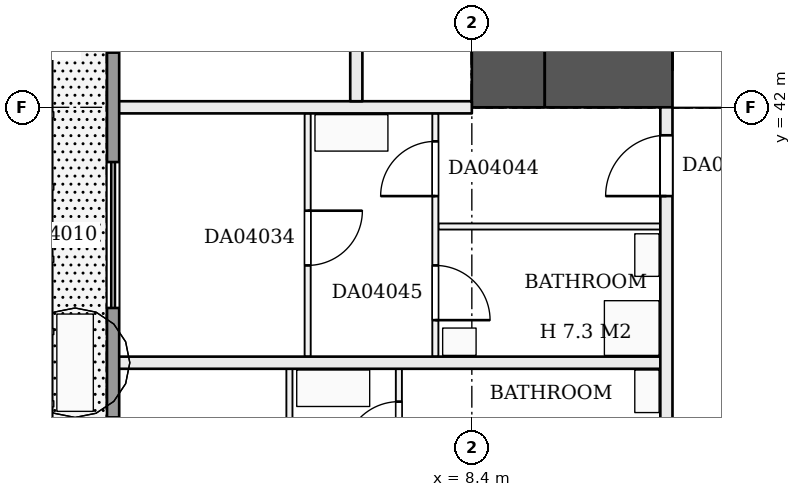
"""IFC4 building model, lengths in metres.
Left out: names, types, materials, properties, quantities, classifications, styles, units other than length and angle.
Written with IfcOpenShell. Run it as: python <this file> out.ifc"""

import sys

from ifc_helpers import new_model, si_unit, direction, frame, frame_2d, origin, place, context, subcontext, project, spatial, rectangle, extrude, element, fill, save


model = new_model("IFC4")
c1 = context("Model", 3, precision=1e-05, world=origin(), true_north=direction((0.0, 1.0)))
c2 = subcontext(c1, "Body", "Model", "MODEL_VIEW")
j1 = project(units=[si_unit("LENGTHUNIT", "METRE"), si_unit("PLANEANGLEUNIT", "RADIAN")], contexts=[c1])
p1 = place(None, origin())
s1 = spatial("IfcSite", under=j1, at=p1, CompositionType="ELEMENT")
p2 = place(p1, origin())
s2 = spatial("IfcBuilding", under=s1, at=p2, CompositionType="ELEMENT")
p3 = place(p2, frame((0.0, 0.0, 25.2)))
s3 = spatial("IfcBuildingStorey", under=s2, at=p3, CompositionType="ELEMENT", Elevation=25.2)
p4 = place(p3, frame((9.0, 58.8, 0.0), z_axis=(0.0, 0.0, 1.0), x_axis=(0.0, -1.0, 0.0)))
e1 = element("IfcWall", 1, at=p4, inside=s3, PredefinedType="SHEAR", context=c2, shape_type="SweptSolid", body=[
    extrude(rectangle(XDim=16.8, YDim=1.2, at=frame_2d((8.4, 0.0))), origin(), (0.0, 0.0, 1.0), 3.22),
])
p5 = place(p4, frame((3.1, 0.0, 0.0)))
e2 = element("IfcOpeningElement", 2, at=p5, cuts=e1, PredefinedType="OPENING", context=c2, shape_type="SweptSolid", body=[
    extrude(rectangle(XDim=1.0, YDim=2.1, at=frame_2d((0.5, 1.05))), frame((0.0, 0.61, 0.0), z_axis=(0.0, -1.0, 0.0), x_axis=(1.0, 0.0, 0.0)), (0.0, 0.0, 1.0), 1.22),
])
p6 = place(p4, frame((12.7, 0.0, 0.0)))
e3 = element("IfcOpeningElement", 3, at=p6, cuts=e1, PredefinedType="OPENING", context=c2, shape_type="SweptSolid", body=[
    extrude(rectangle(XDim=1.0, YDim=2.1, at=frame_2d((0.5, 1.05))), frame((0.0, 0.61, 0.0), z_axis=(0.0, -1.0, 0.0), x_axis=(1.0, 0.0, 0.0)), (0.0, 0.0, 1.0), 1.22),
])
p7 = place(p3, frame((9.6, 42.6, 0.0), z_axis=(0.0, 0.0, 1.0), x_axis=(1.0, 0.0, 0.0)))
e4 = element("IfcWall", 4, at=p7, inside=s3, PredefinedType="SHEAR", context=c2, shape_type="SweptSolid", body=[
    extrude(rectangle(XDim=14.4, YDim=1.2, at=frame_2d((7.2, 0.0))), origin(), (0.0, 0.0, 1.0), 3.22),
])
p8 = place(p7, frame((2.1, 0.0, 0.0)))
e5 = element("IfcOpeningElement", 5, at=p8, cuts=e4, PredefinedType="OPENING", context=c2, shape_type="SweptSolid", body=[
    extrude(rectangle(XDim=1.8, YDim=2.1, at=frame_2d((0.9, 1.05))), frame((0.0, 0.61, 0.0), z_axis=(0.0, -1.0, 0.0), x_axis=(1.0, 0.0, 0.0)), (0.0, 0.0, 1.0), 1.22),
])
p9 = place(p3, frame((2.5, 37.8, 0.0), z_axis=(0.0, 0.0, 1.0), x_axis=(1.0, 0.0, 0.0)))
e6 = element("IfcWall", 6, at=p9, inside=s3, PredefinedType="PARTITIONING", context=c2, shape_type="SweptSolid", body=[
    extrude(rectangle(XDim=9.0, YDim=0.2, at=frame_2d((4.5, 0.0))), origin(), (0.0, 0.0, 1.0), 3.22),
])
p10 = place(p3, frame((7.85, 40.04, 0.0), z_axis=(0.0, 0.0, 1.0), x_axis=(1.0, 0.0, 0.0)))
e7 = element("IfcWall", 7, at=p10, inside=s3, PredefinedType="PARTITIONING", context=c2, shape_type="SweptSolid", body=[
    extrude(rectangle(XDim=3.65, YDim=0.1, at=frame_2d((1.825, 0.0))), origin(), (0.0, 0.0, 1.0), 3.22),
])
p11 = place(p3, frame((2.5, 42.0, 0.0), z_axis=(0.0, 0.0, 1.0), x_axis=(1.0, 0.0, 0.0)))
e8 = element("IfcWall", 8, at=p11, inside=s3, PredefinedType="PARTITIONING", context=c2, shape_type="SweptSolid", body=[
    extrude(rectangle(XDim=5.9, YDim=0.2, at=frame_2d((2.95, 0.0))), origin(), (0.0, 0.0, 1.0), 3.22),
])
p12 = place(p3, frame((5.4, 33.7, 0.0), z_axis=(0.0, 0.0, 1.0), x_axis=(0.0, 1.0, 0.0)))
e9 = element("IfcWall", 9, at=p12, inside=s3, PredefinedType="PARTITIONING", context=c2, shape_type="SweptSolid", body=[
    extrude(rectangle(XDim=4.0, YDim=0.1, at=frame_2d((2.0, 0.0))), origin(), (0.0, 0.0, 1.0), 3.22),
])
p13 = place(p12, frame((1.5, 0.0, 0.0)))
e10 = element("IfcOpeningElement", 10, at=p13, cuts=e9, PredefinedType="OPENING", context=c2, shape_type="SweptSolid", body=[
    extrude(rectangle(XDim=0.9, YDim=2.1, at=frame_2d((0.45, 1.05))), frame((0.0, 0.06, 0.0), z_axis=(0.0, -1.0, 0.0), x_axis=(1.0, 0.0, 0.0)), (0.0, 0.0, 1.0), 0.12),
])
p14 = place(p3, frame((5.7, 37.9, 0.0), z_axis=(0.0, 0.0, 1.0), x_axis=(0.0, 1.0, 0.0)))
e11 = element("IfcWall", 11, at=p14, inside=s3, PredefinedType="PARTITIONING", context=c2, shape_type="SweptSolid", body=[
    extrude(rectangle(XDim=4.0, YDim=0.1, at=frame_2d((2.0, 0.0))), origin(), (0.0, 0.0, 1.0), 3.22),
])
p15 = place(p14, frame((1.5, 0.0, 0.0)))
e12 = element("IfcOpeningElement", 12, at=p15, cuts=e11, PredefinedType="OPENING", context=c2, shape_type="SweptSolid", body=[
    extrude(rectangle(XDim=0.9, YDim=2.1, at=frame_2d((0.45, 1.05))), frame((0.0, 0.06, 0.0), z_axis=(0.0, -1.0, 0.0), x_axis=(1.0, 0.0, 0.0)), (0.0, 0.0, 1.0), 0.12),
])
p16 = place(p3, frame((6.5, 42.1, 0.0), z_axis=(0.0, 0.0, 1.0), x_axis=(0.0, 1.0, 0.0)))
e13 = element("IfcWall", 13, at=p16, inside=s3, PredefinedType="PARTITIONING", context=c2, shape_type="SweptSolid", body=[
    extrude(rectangle(XDim=14.2, YDim=0.2, at=frame_2d((7.1, 0.0))), origin(), (0.0, 0.0, 1.0), 3.22),
])
p17 = place(p16, frame((1.5, 0.0, 0.0)))
e14 = element("IfcOpeningElement", 14, at=p17, cuts=e13, PredefinedType="OPENING", context=c2, shape_type="SweptSolid", body=[
    extrude(rectangle(XDim=1.0, YDim=2.1, at=frame_2d((0.5, 1.05))), frame((0.0, 0.11, 0.0), z_axis=(0.0, -1.0, 0.0), x_axis=(1.0, 0.0, 0.0)), (0.0, 0.0, 1.0), 0.22),
])
p18 = place(p16, frame((5.7, 0.0, 0.0)))
e15 = element("IfcOpeningElement", 15, at=p18, cuts=e13, PredefinedType="OPENING", context=c2, shape_type="SweptSolid", body=[
    extrude(rectangle(XDim=1.0, YDim=2.1, at=frame_2d((0.5, 1.05))), frame((0.0, 0.11, 0.0), z_axis=(0.0, -1.0, 0.0), x_axis=(1.0, 0.0, 0.0)), (0.0, 0.0, 1.0), 0.22),
])
p19 = place(p16, frame((10.8, 0.0, 0.0)))
e16 = element("IfcOpeningElement", 16, at=p19, cuts=e13, PredefinedType="OPENING", context=c2, shape_type="SweptSolid", body=[
    extrude(rectangle(XDim=1.0, YDim=2.1, at=frame_2d((0.5, 1.05))), frame((0.0, 0.11, 0.0), z_axis=(0.0, -1.0, 0.0), x_axis=(1.0, 0.0, 0.0)), (0.0, 0.0, 1.0), 0.22),
])
p20 = place(p3, frame((7.2, 33.7, 0.0), z_axis=(0.0, 0.0, 1.0), x_axis=(0.0, 1.0, 0.0)))
e17 = element("IfcWall", 17, at=p20, inside=s3, PredefinedType="PARTITIONING", context=c2, shape_type="SweptSolid", body=[
    extrude(rectangle(XDim=4.0, YDim=0.1, at=frame_2d((2.0, 0.0))), origin(), (0.0, 0.0, 1.0), 3.22),
])
p21 = place(p20, frame((0.5, 0.0, 0.0)))
e18 = element("IfcOpeningElement", 18, at=p21, cuts=e17, PredefinedType="OPENING", context=c2, shape_type="SweptSolid", body=[
    extrude(rectangle(XDim=0.9, YDim=2.1, at=frame_2d((0.45, 1.05))), frame((0.0, 0.06, 0.0), z_axis=(0.0, -1.0, 0.0), x_axis=(1.0, 0.0, 0.0)), (0.0, 0.0, 1.0), 0.12),
])
p22 = place(p20, frame((2.56, 0.0, 0.0)))
e19 = element("IfcOpeningElement", 19, at=p22, cuts=e17, PredefinedType="OPENING", context=c2, shape_type="SweptSolid", body=[
    extrude(rectangle(XDim=0.9, YDim=2.1, at=frame_2d((0.45, 1.05))), frame((0.0, 0.06, 0.0), z_axis=(0.0, -1.0, 0.0), x_axis=(1.0, 0.0, 0.0)), (0.0, 0.0, 1.0), 0.12),
])
p23 = place(p3, frame((7.8, 37.9, 0.0), z_axis=(0.0, 0.0, 1.0), x_axis=(0.0, 1.0, 0.0)))
e20 = element("IfcWall", 20, at=p23, inside=s3, PredefinedType="PARTITIONING", context=c2, shape_type="SweptSolid", body=[
    extrude(rectangle(XDim=4.0, YDim=0.1, at=frame_2d((2.0, 0.0))), origin(), (0.0, 0.0, 1.0), 3.22),
])
p24 = place(p23, frame((2.64, 0.0, 0.0)))
e21 = element("IfcOpeningElement", 21, at=p24, cuts=e20, PredefinedType="OPENING", context=c2, shape_type="SweptSolid", body=[
    extrude(rectangle(XDim=0.9, YDim=2.1, at=frame_2d((0.45, 1.05))), frame((0.0, 0.06, 0.0), z_axis=(0.0, -1.0, 0.0), x_axis=(1.0, 0.0, 0.0)), (0.0, 0.0, 1.0), 0.12),
])
p25 = place(p23, frame((0.6, 0.0, 0.0)))
e22 = element("IfcOpeningElement", 22, at=p25, cuts=e20, PredefinedType="OPENING", context=c2, shape_type="SweptSolid", body=[
    extrude(rectangle(XDim=0.9, YDim=2.1, at=frame_2d((0.45, 1.05))), frame((0.0, 0.06, 0.0), z_axis=(0.0, -1.0, 0.0), x_axis=(1.0, 0.0, 0.0)), (0.0, 0.0, 1.0), 0.12),
])
p26 = place(p3, frame((11.6, 11.7, 0.0), z_axis=(0.0, 0.0, 1.0), x_axis=(0.0, 1.0, 0.0)))
e23 = element("IfcWall", 23, at=p26, inside=s3, PredefinedType="PARTITIONING", context=c2, shape_type="SweptSolid", body=[
    extrude(rectangle(XDim=30.3, YDim=0.2, at=frame_2d((15.15, 0.0))), origin(), (0.0, 0.0, 1.0), 3.22),
])
p27 = place(p26, frame((15.0, 0.0, 0.0)))
e24 = element("IfcOpeningElement", 24, at=p27, cuts=e23, PredefinedType="OPENING", context=c2, shape_type="SweptSolid", body=[
    extrude(rectangle(XDim=1.0, YDim=2.1, at=frame_2d((0.5, 1.05))), frame((0.0, 0.11, 0.0), z_axis=(0.0, -1.0, 0.0), x_axis=(1.0, 0.0, 0.0)), (0.0, 0.0, 1.0), 0.22),
])
p28 = place(p26, frame((18.2, 0.0, 0.0)))
e25 = element("IfcOpeningElement", 25, at=p28, cuts=e23, PredefinedType="OPENING", context=c2, shape_type="SweptSolid", body=[
    extrude(rectangle(XDim=1.0, YDim=2.1, at=frame_2d((0.5, 1.05))), frame((0.0, 0.11, 0.0), z_axis=(0.0, -1.0, 0.0), x_axis=(1.0, 0.0, 0.0)), (0.0, 0.0, 1.0), 0.22),
])
p29 = place(p26, frame((22.4, 0.0, 0.0)))
e26 = element("IfcOpeningElement", 26, at=p29, cuts=e23, PredefinedType="OPENING", context=c2, shape_type="SweptSolid", body=[
    extrude(rectangle(XDim=1.0, YDim=2.1, at=frame_2d((0.5, 1.05))), frame((0.0, 0.11, 0.0), z_axis=(0.0, -1.0, 0.0), x_axis=(1.0, 0.0, 0.0)), (0.0, 0.0, 1.0), 0.22),
])
p30 = place(p26, frame((28.84, 0.0, 0.0)))
e27 = element("IfcOpeningElement", 27, at=p30, cuts=e23, PredefinedType="OPENING", context=c2, shape_type="SweptSolid", body=[
    extrude(rectangle(XDim=1.0, YDim=2.1, at=frame_2d((0.5, 1.05))), frame((0.0, 0.11, 0.0), z_axis=(0.0, -1.0, 0.0), x_axis=(1.0, 0.0, 0.0)), (0.0, 0.0, 1.0), 0.22),
])
p31 = place(p3, frame((2.5, 53.8, 0.0), z_axis=(0.0, 0.0, 1.0), x_axis=(0.0, -1.0, 0.0)))
e28 = element("IfcWall", 28, at=p31, inside=s3, PredefinedType="SOLIDWALL", context=c2, shape_type="SweptSolid", body=[
    extrude(rectangle(XDim=48.8, YDim=0.2, at=frame_2d((24.4, 0.0))), origin(), (0.0, 0.0, 1.0), 3.22),
])
p32 = place(p31, frame((46.1, 0.0, 0.0)))
e29 = element("IfcOpeningElement", 29, at=p32, cuts=e28, PredefinedType="OPENING", context=c2, shape_type="SweptSolid", body=[
    extrude(rectangle(XDim=2.4, YDim=2.2, at=frame_2d((1.2, 1.1))), frame((0.0, 0.11, 0.0), z_axis=(0.0, -1.0, 0.0), x_axis=(1.0, 0.0, 0.0)), (0.0, 0.0, 1.0), 0.22),
])
p33 = place(p31, frame((42.1, 0.0, 0.0)))
e30 = element("IfcOpeningElement", 30, at=p33, cuts=e28, PredefinedType="OPENING", context=c2, shape_type="SweptSolid", body=[
    extrude(rectangle(XDim=2.4, YDim=2.2, at=frame_2d((1.2, 1.1))), frame((0.0, 0.11, 0.0), z_axis=(0.0, -1.0, 0.0), x_axis=(1.0, 0.0, 0.0)), (0.0, 0.0, 1.0), 0.22),
])
p34 = place(p31, frame((37.9, 0.0, 0.0)))
e31 = element("IfcOpeningElement", 31, at=p34, cuts=e28, PredefinedType="OPENING", context=c2, shape_type="SweptSolid", body=[
    extrude(rectangle(XDim=2.4, YDim=2.2, at=frame_2d((1.2, 1.1))), frame((0.0, 0.11, 0.0), z_axis=(0.0, -1.0, 0.0), x_axis=(1.0, 0.0, 0.0)), (0.0, 0.0, 1.0), 0.22),
])
p35 = place(p31, frame((33.7, 0.0, 0.0)))
e32 = element("IfcOpeningElement", 32, at=p35, cuts=e28, PredefinedType="OPENING", context=c2, shape_type="SweptSolid", body=[
    extrude(rectangle(XDim=2.4, YDim=2.2, at=frame_2d((1.2, 1.1))), frame((0.0, 0.11, 0.0), z_axis=(0.0, -1.0, 0.0), x_axis=(1.0, 0.0, 0.0)), (0.0, 0.0, 1.0), 0.22),
])
p36 = place(p31, frame((29.5, 0.0, 0.0)))
e33 = element("IfcOpeningElement", 33, at=p36, cuts=e28, PredefinedType="OPENING", context=c2, shape_type="SweptSolid", body=[
    extrude(rectangle(XDim=2.4, YDim=2.2, at=frame_2d((1.2, 1.1))), frame((0.0, 0.11, 0.0), z_axis=(0.0, -1.0, 0.0), x_axis=(1.0, 0.0, 0.0)), (0.0, 0.0, 1.0), 0.22),
])
p37 = place(p31, frame((25.3, 0.0, 0.9)))
e34 = element("IfcOpeningElement", 34, at=p37, cuts=e28, PredefinedType="OPENING", context=c2, shape_type="SweptSolid", body=[
    extrude(rectangle(XDim=2.4, YDim=1.5, at=frame_2d((1.2, 0.75))), frame((0.0, 0.11, 0.0), z_axis=(0.0, -1.0, 0.0), x_axis=(1.0, 0.0, 0.0)), (0.0, 0.0, 1.0), 0.22),
])
p38 = place(p31, frame((21.1, 0.0, 0.0)))
e35 = element("IfcOpeningElement", 35, at=p38, cuts=e28, PredefinedType="OPENING", context=c2, shape_type="SweptSolid", body=[
    extrude(rectangle(XDim=2.4, YDim=2.2, at=frame_2d((1.2, 1.1))), frame((0.0, 0.11, 0.0), z_axis=(0.0, -1.0, 0.0), x_axis=(1.0, 0.0, 0.0)), (0.0, 0.0, 1.0), 0.22),
])
p39 = place(p31, frame((16.9, 0.0, 0.0)))
e36 = element("IfcOpeningElement", 36, at=p39, cuts=e28, PredefinedType="OPENING", context=c2, shape_type="SweptSolid", body=[
    extrude(rectangle(XDim=2.4, YDim=2.2, at=frame_2d((1.2, 1.1))), frame((0.0, 0.11, 0.0), z_axis=(0.0, -1.0, 0.0), x_axis=(1.0, 0.0, 0.0)), (0.0, 0.0, 1.0), 0.22),
])
p40 = place(p31, frame((12.7, 0.0, 0.0)))
e37 = element("IfcOpeningElement", 37, at=p40, cuts=e28, PredefinedType="OPENING", context=c2, shape_type="SweptSolid", body=[
    extrude(rectangle(XDim=2.4, YDim=2.2, at=frame_2d((1.2, 1.1))), frame((0.0, 0.11, 0.0), z_axis=(0.0, -1.0, 0.0), x_axis=(1.0, 0.0, 0.0)), (0.0, 0.0, 1.0), 0.22),
])
p41 = place(p31, frame((8.5, 0.0, 0.9)))
e38 = element("IfcOpeningElement", 38, at=p41, cuts=e28, PredefinedType="OPENING", context=c2, shape_type="SweptSolid", body=[
    extrude(rectangle(XDim=2.4, YDim=1.5, at=frame_2d((1.2, 0.75))), frame((0.0, 0.11, 0.0), z_axis=(0.0, -1.0, 0.0), x_axis=(1.0, 0.0, 0.0)), (0.0, 0.0, 1.0), 0.22),
])
p42 = place(p31, frame((4.3, 0.0, 0.9)))
e39 = element("IfcOpeningElement", 39, at=p42, cuts=e28, PredefinedType="OPENING", context=c2, shape_type="SweptSolid", body=[
    extrude(rectangle(XDim=2.4, YDim=1.5, at=frame_2d((1.2, 0.75))), frame((0.0, 0.11, 0.0), z_axis=(0.0, -1.0, 0.0), x_axis=(1.0, 0.0, 0.0)), (0.0, 0.0, 1.0), 0.22),
])
p43 = place(p31, frame((0.3, 0.0, 0.9)))
e40 = element("IfcOpeningElement", 40, at=p43, cuts=e28, PredefinedType="OPENING", context=c2, shape_type="SweptSolid", body=[
    extrude(rectangle(XDim=2.4, YDim=1.5, at=frame_2d((1.2, 0.75))), frame((0.0, 0.11, 0.0), z_axis=(0.0, -1.0, 0.0), x_axis=(1.0, 0.0, 0.0)), (0.0, 0.0, 1.0), 0.22),
])
p44 = place(p8, origin())
e41 = element("IfcDoor", 41, at=p44, inside=s3, OperationType="DOUBLE_DOOR_SINGLE_SWING", PredefinedType="DOOR", context=c2, shape_type="SweptSolid", body=[
    extrude(rectangle(XDim=1.8, YDim=2.1, at=frame_2d((0.9, 1.05))), frame((0.0, 0.025, 0.0), z_axis=(0.0, -1.0, 0.0), x_axis=(1.0, 0.0, 0.0)), (0.0, 0.0, 1.0), 0.05),
])
fill(e5, e41)
p45 = place(p15, frame((0.9, 0.0, 0.0), z_axis=(0.0, 0.0, 1.0), x_axis=(-1.0, 0.0, 0.0)))
e42 = element("IfcDoor", 42, at=p45, inside=s3, OperationType="SINGLE_SWING_LEFT", PredefinedType="DOOR", context=c2, shape_type="SweptSolid", body=[
    extrude(rectangle(XDim=0.9, YDim=2.1, at=frame_2d((0.45, 1.05))), frame((0.0, 0.025, 0.0), z_axis=(0.0, -1.0, 0.0), x_axis=(1.0, 0.0, 0.0)), (0.0, 0.0, 1.0), 0.05),
])
fill(e12, e42)
p46 = place(p22, origin())
e43 = element("IfcDoor", 43, at=p46, inside=s3, OperationType="SINGLE_SWING_LEFT", PredefinedType="DOOR", context=c2, shape_type="SweptSolid", body=[
    extrude(rectangle(XDim=0.9, YDim=2.1, at=frame_2d((0.45, 1.05))), frame((0.0, 0.025, 0.0), z_axis=(0.0, -1.0, 0.0), x_axis=(1.0, 0.0, 0.0)), (0.0, 0.0, 1.0), 0.05),
])
fill(e19, e43)
p47 = place(p24, origin())
e44 = element("IfcDoor", 44, at=p47, inside=s3, OperationType="SINGLE_SWING_LEFT", PredefinedType="DOOR", context=c2, shape_type="SweptSolid", body=[
    extrude(rectangle(XDim=0.9, YDim=2.1, at=frame_2d((0.45, 1.05))), frame((0.0, 0.025, 0.0), z_axis=(0.0, -1.0, 0.0), x_axis=(1.0, 0.0, 0.0)), (0.0, 0.0, 1.0), 0.05),
])
fill(e21, e44)
p48 = place(p25, frame((0.9, 0.0, 0.0), z_axis=(0.0, 0.0, 1.0), x_axis=(-1.0, 0.0, 0.0)))
e45 = element("IfcDoor", 45, at=p48, inside=s3, OperationType="SINGLE_SWING_RIGHT", PredefinedType="DOOR", context=c2, shape_type="SweptSolid", body=[
    extrude(rectangle(XDim=0.9, YDim=2.1, at=frame_2d((0.45, 1.05))), frame((0.0, 0.025, 0.0), z_axis=(0.0, -1.0, 0.0), x_axis=(1.0, 0.0, 0.0)), (0.0, 0.0, 1.0), 0.05),
])
fill(e22, e45)
p49 = place(p30, origin())
e46 = element("IfcDoor", 46, at=p49, inside=s3, OperationType="SINGLE_SWING_LEFT", PredefinedType="DOOR", context=c2, shape_type="SweptSolid", body=[
    extrude(rectangle(XDim=1.0, YDim=2.1, at=frame_2d((0.5, 1.05))), frame((0.0, 0.025, 0.0), z_axis=(0.0, -1.0, 0.0), x_axis=(1.0, 0.0, 0.0)), (0.0, 0.0, 1.0), 0.05),
])
fill(e27, e46)
p50 = place(p39, origin())
e47 = element("IfcDoor", 47, at=p50, inside=s3, OperationType="DOUBLE_DOOR_SLIDING", PredefinedType="DOOR", context=c2, shape_type="SweptSolid", body=[
    extrude(rectangle(XDim=2.4, YDim=2.2, at=frame_2d((1.2, 1.1))), frame((0.0, 0.025, 0.0), z_axis=(0.0, -1.0, 0.0), x_axis=(1.0, 0.0, 0.0)), (0.0, 0.0, 1.0), 0.05),
])
fill(e36, e47)
p51 = place(p40, origin())
e48 = element("IfcDoor", 48, at=p51, inside=s3, OperationType="DOUBLE_DOOR_SLIDING", PredefinedType="DOOR", context=c2, shape_type="SweptSolid", body=[
    extrude(rectangle(XDim=2.4, YDim=2.2, at=frame_2d((1.2, 1.1))), frame((0.0, 0.025, 0.0), z_axis=(0.0, -1.0, 0.0), x_axis=(1.0, 0.0, 0.0)), (0.0, 0.0, 1.0), 0.05),
])
fill(e37, e48)
save(model, sys.argv[1])
